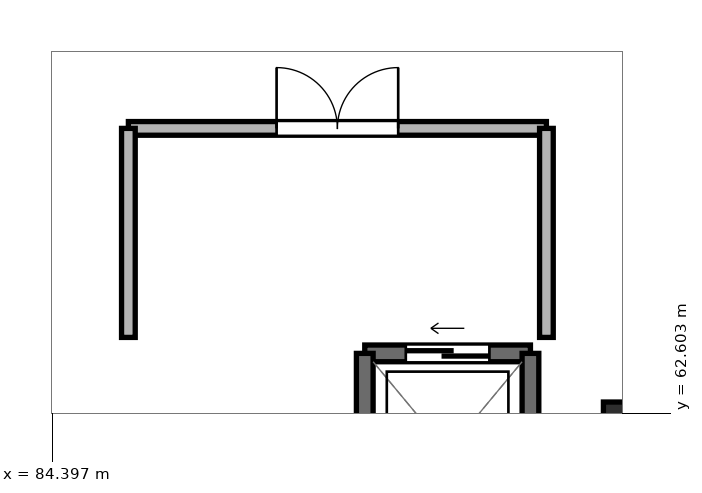
"""IFC4 building model, lengths in metres.
Left out: names, types, materials, properties, quantities, classifications, styles, units other than length and angle.
Written with IfcOpenShell. Run it as: python <this file> out.ifc"""

import sys

from ifc_helpers import new_model, si_unit, direction, frame, frame_2d, origin, origin_2d, place, context, subcontext, project, spatial, rectangle, extrude, element, fill, save


model = new_model("IFC4")
c1 = context("Model", 3, precision=1e-05, world=origin(), true_north=direction((0.0, 1.0)))
c2 = subcontext(c1, "Body", "Model", "MODEL_VIEW")
j1 = project(units=[si_unit("LENGTHUNIT", "METRE"), si_unit("PLANEANGLEUNIT", "RADIAN")], contexts=[c1])
p1 = place(None, origin())
s1 = spatial("IfcSite", under=j1, at=p1, CompositionType="ELEMENT")
p2 = place(p1, origin())
s2 = spatial("IfcBuilding", under=s1, at=p2, CompositionType="ELEMENT")
p3 = place(p2, frame((0.0, 0.0, 53.55)))
s3 = spatial("IfcBuildingStorey", under=s2, at=p3, CompositionType="ELEMENT", Elevation=53.55)
p4 = place(p3, frame((92.0, 62.4, -0.22), z_axis=(0.0, 0.0, 1.0), x_axis=(1.0, 0.0, 0.0)))
e1 = element("IfcColumn", 1, at=p4, inside=s3, PredefinedType="COLUMN", context=c2, shape_type="SweptSolid", body=[
    extrude(rectangle(XDim=0.7, YDim=0.7, at=origin_2d()), origin(), (0.0, 0.0, 1.0), 3.25),
])
p5 = place(p3, frame((90.69, 63.39, 0.0), z_axis=(0.0, 0.0, 1.0), x_axis=(-1.0, 0.0, 0.0)))
e2 = element("IfcWall", 2, at=p5, inside=s3, PredefinedType="SHEAR", context=c2, shape_type="SweptSolid", body=[
    extrude(rectangle(XDim=2.18, YDim=0.22, at=frame_2d((1.09, 0.0))), origin(), (0.0, 0.0, 1.0), 3.03),
])
p6 = place(p5, frame((0.54, 0.0, 0.0)))
e3 = element("IfcOpeningElement", 3, at=p6, cuts=e2, PredefinedType="OPENING", context=c2, shape_type="SweptSolid", body=[
    extrude(rectangle(XDim=1.1, YDim=2.2, at=frame_2d((0.55, 1.1))), frame((0.0, 0.122, 0.0), z_axis=(0.0, -1.0, 0.0), x_axis=(1.0, 0.0, 0.0)), (0.0, 0.0, 1.0), 0.244),
])
for number, where, z_axis, x_axis in (
    (4, (88.51, 63.39, 0.0), (0.0, 0.0, 1.0), (0.0, -1.0, 0.0)),
    (5, (90.69, 60.81, 0.0), (0.0, 0.0, 1.0), (0.0, 1.0, 0.0)),
):
    element("IfcWall", number, at=place(p3, frame(where, z_axis=z_axis, x_axis=x_axis)), inside=s3, PredefinedType="SHEAR", context=c2, shape_type="SweptSolid", body=[
        extrude(rectangle(XDim=2.58, YDim=0.22, at=frame_2d((1.29, 0.0))), origin(), (0.0, 0.0, 1.0), 3.03),
    ])
p7 = place(p3, frame((85.4, 66.35, 0.0), z_axis=(0.0, 0.0, 1.0), x_axis=(1.0, 0.0, 0.0)))
e6 = element("IfcWall", 6, at=p7, inside=s3, PredefinedType="PARTITIONING", context=c2, shape_type="SweptSolid", body=[
    extrude(rectangle(XDim=5.5, YDim=0.18, at=frame_2d((2.75, 0.0))), origin(), (0.0, 0.0, 1.0), 2.53),
])
p8 = place(p7, frame((1.95, 0.0, 0.0)))
e7 = element("IfcOpeningElement", 7, at=p8, cuts=e6, PredefinedType="OPENING", context=c2, shape_type="SweptSolid", body=[
    extrude(rectangle(XDim=1.6, YDim=2.2, at=frame_2d((0.8, 1.1))), frame((0.0, 0.102, 0.0), z_axis=(0.0, -1.0, 0.0), x_axis=(1.0, 0.0, 0.0)), (0.0, 0.0, 1.0), 0.204),
])
for number, where, z_axis, x_axis in (
    (8, (85.4, 63.6, 0.0), (0.0, 0.0, 1.0), (0.0, 1.0, 0.0)),
    (9, (90.9, 63.6, 0.0), (0.0, 0.0, 1.0), (0.0, 1.0, 0.0)),
):
    element("IfcWall", number, at=place(p3, frame(where, z_axis=z_axis, x_axis=x_axis)), inside=s3, PredefinedType="PARTITIONING", context=c2, shape_type="SweptSolid", body=[
        extrude(rectangle(XDim=2.75, YDim=0.18, at=frame_2d((1.375, 0.0))), origin(), (0.0, 0.0, 1.0), 2.53),
    ])
p9 = place(p6, origin())
e10 = element("IfcDoor", 10, at=p9, inside=s3, OperationType="SLIDING_TO_RIGHT", PredefinedType="DOOR", context=c2, shape_type="SweptSolid", body=[
    extrude(rectangle(XDim=1.1, YDim=2.2, at=frame_2d((0.55, 1.1))), frame((0.0, 0.025, 0.0), z_axis=(0.0, -1.0, 0.0), x_axis=(1.0, 0.0, 0.0)), (0.0, 0.0, 1.0), 0.05),
])
fill(e3, e10)
p10 = place(p8, origin())
e11 = element("IfcDoor", 11, at=p10, inside=s3, OperationType="DOUBLE_DOOR_SINGLE_SWING", PredefinedType="DOOR", context=c2, shape_type="SweptSolid", body=[
    extrude(rectangle(XDim=1.6, YDim=2.2, at=frame_2d((0.8, 1.1))), frame((0.0, 0.025, 0.0), z_axis=(0.0, -1.0, 0.0), x_axis=(1.0, 0.0, 0.0)), (0.0, 0.0, 1.0), 0.05),
])
fill(e7, e11)
save(model, sys.argv[1])
